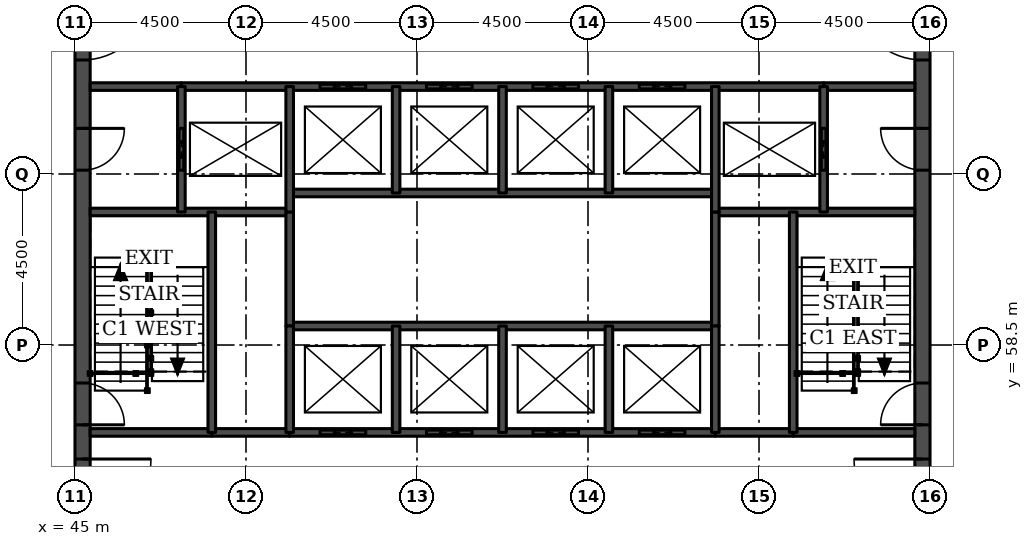
"""IFC4 building model, lengths in metres.
Left out: names, types, materials, properties, quantities, classifications, styles, units other than length and angle.
Written with IfcOpenShell. Run it as: python <this file> out.ifc"""

import sys

from ifc_helpers import new_model, si_unit, direction, frame, frame_2d, origin, place, context, subcontext, project, spatial, rectangle, extrude, element, fill, save


model = new_model("IFC4")
c1 = context("Model", 3, precision=1e-05, world=origin(), true_north=direction((0.0, 1.0)))
c2 = subcontext(c1, "Body", "Model", "MODEL_VIEW")
j1 = project(units=[si_unit("LENGTHUNIT", "METRE"), si_unit("PLANEANGLEUNIT", "RADIAN")], contexts=[c1])
p1 = place(None, origin())
s1 = spatial("IfcSite", under=j1, at=p1, CompositionType="ELEMENT")
p2 = place(p1, origin())
s2 = spatial("IfcBuilding", under=s1, at=p2, CompositionType="ELEMENT")
p3 = place(p2, frame((0.0, 0.0, 166.2)))
s3 = spatial("IfcBuildingStorey", under=s2, at=p3, CompositionType="ELEMENT", Elevation=166.2)
p4 = place(p3, frame((45.2, 49.5, 0.0), z_axis=(0.0, 0.0, 1.0), x_axis=(0.0, 1.0, 0.0)))
e1 = element("IfcWall", 1, at=p4, inside=s3, PredefinedType="SHEAR", context=c2, shape_type="SweptSolid", body=[
    extrude(rectangle(XDim=22.5, YDim=0.4, at=frame_2d((11.25, 0.0))), origin(), (0.0, 0.0, 1.0), 3.7),
])
p5 = place(p4, frame((4.2, 0.0, 0.0)))
e2 = element("IfcOpeningElement", 2, at=p5, cuts=e1, PredefinedType="OPENING", context=c2, shape_type="SweptSolid", body=[
    extrude(rectangle(XDim=1.8, YDim=2.1, at=frame_2d((0.9, 1.05))), frame((0.0, 0.21, 0.0), z_axis=(0.0, -1.0, 0.0), x_axis=(1.0, 0.0, 0.0)), (0.0, 0.0, 1.0), 0.42),
])
p6 = place(p4, frame((6.9, 0.0, 0.0)))
e3 = element("IfcOpeningElement", 3, at=p6, cuts=e1, PredefinedType="OPENING", context=c2, shape_type="SweptSolid", body=[
    extrude(rectangle(XDim=1.1, YDim=2.1, at=frame_2d((0.55, 1.05))), frame((0.0, 0.21, 0.0), z_axis=(0.0, -1.0, 0.0), x_axis=(1.0, 0.0, 0.0)), (0.0, 0.0, 1.0), 0.42),
])
p7 = place(p4, frame((13.6, 0.0, 0.0)))
e4 = element("IfcOpeningElement", 4, at=p7, cuts=e1, PredefinedType="OPENING", context=c2, shape_type="SweptSolid", body=[
    extrude(rectangle(XDim=1.1, YDim=2.1, at=frame_2d((0.55, 1.05))), frame((0.0, 0.21, 0.0), z_axis=(0.0, -1.0, 0.0), x_axis=(1.0, 0.0, 0.0)), (0.0, 0.0, 1.0), 0.42),
])
p8 = place(p4, frame((16.5, 0.0, 0.0)))
e5 = element("IfcOpeningElement", 5, at=p8, cuts=e1, PredefinedType="OPENING", context=c2, shape_type="SweptSolid", body=[
    extrude(rectangle(XDim=1.8, YDim=2.1, at=frame_2d((0.9, 1.05))), frame((0.0, 0.21, 0.0), z_axis=(0.0, -1.0, 0.0), x_axis=(1.0, 0.0, 0.0)), (0.0, 0.0, 1.0), 0.42),
])
p9 = place(p3, frame((67.3, 49.5, 0.0), z_axis=(0.0, 0.0, 1.0), x_axis=(0.0, 1.0, 0.0)))
e6 = element("IfcWall", 6, at=p9, inside=s3, PredefinedType="SHEAR", context=c2, shape_type="SweptSolid", body=[
    extrude(rectangle(XDim=22.5, YDim=0.4, at=frame_2d((11.25, 0.0))), origin(), (0.0, 0.0, 1.0), 3.7),
])
p10 = place(p9, frame((4.2, 0.0, 0.0)))
e7 = element("IfcOpeningElement", 7, at=p10, cuts=e6, PredefinedType="OPENING", context=c2, shape_type="SweptSolid", body=[
    extrude(rectangle(XDim=1.8, YDim=2.1, at=frame_2d((0.9, 1.05))), frame((0.0, 0.21, 0.0), z_axis=(0.0, -1.0, 0.0), x_axis=(1.0, 0.0, 0.0)), (0.0, 0.0, 1.0), 0.42),
])
p11 = place(p9, frame((6.9, 0.0, 0.0)))
e8 = element("IfcOpeningElement", 8, at=p11, cuts=e6, PredefinedType="OPENING", context=c2, shape_type="SweptSolid", body=[
    extrude(rectangle(XDim=1.1, YDim=2.1, at=frame_2d((0.55, 1.05))), frame((0.0, 0.21, 0.0), z_axis=(0.0, -1.0, 0.0), x_axis=(1.0, 0.0, 0.0)), (0.0, 0.0, 1.0), 0.42),
])
p12 = place(p9, frame((13.6, 0.0, 0.0)))
e9 = element("IfcOpeningElement", 9, at=p12, cuts=e6, PredefinedType="OPENING", context=c2, shape_type="SweptSolid", body=[
    extrude(rectangle(XDim=1.1, YDim=2.1, at=frame_2d((0.55, 1.05))), frame((0.0, 0.21, 0.0), z_axis=(0.0, -1.0, 0.0), x_axis=(1.0, 0.0, 0.0)), (0.0, 0.0, 1.0), 0.42),
])
p13 = place(p9, frame((16.5, 0.0, 0.0)))
e10 = element("IfcOpeningElement", 10, at=p13, cuts=e6, PredefinedType="OPENING", context=c2, shape_type="SweptSolid", body=[
    extrude(rectangle(XDim=1.8, YDim=2.1, at=frame_2d((0.9, 1.05))), frame((0.0, 0.21, 0.0), z_axis=(0.0, -1.0, 0.0), x_axis=(1.0, 0.0, 0.0)), (0.0, 0.0, 1.0), 0.42),
])
for number, where, z_axis, x_axis in (
    (11, (48.6, 56.2, 0.0), (0.0, 0.0, 1.0), (1.0, 0.0, 0.0)),
    (12, (61.85, 56.2, 0.0), (0.0, 0.0, 1.0), (1.0, 0.0, 0.0)),
):
    element("IfcWall", number, at=place(p3, frame(where, z_axis=z_axis, x_axis=x_axis)), inside=s3, PredefinedType="SOLIDWALL", context=c2, shape_type="SweptSolid", body=[
        extrude(rectangle(XDim=2.05, YDim=0.2, at=frame_2d((1.025, 0.0))), origin(), (0.0, 0.0, 1.0), 3.55),
    ])
p14 = place(p3, frame((45.4, 56.2, 0.0), z_axis=(0.0, 0.0, 1.0), x_axis=(1.0, 0.0, 0.0)))
e13 = element("IfcWall", 13, at=p14, inside=s3, PredefinedType="SOLIDWALL", context=c2, shape_type="SweptSolid", body=[
    extrude(rectangle(XDim=3.2, YDim=0.2, at=frame_2d((1.6, 0.0))), origin(), (0.0, 0.0, 1.0), 3.55),
])
p15 = place(p3, frame((50.65, 56.2, 0.0), z_axis=(0.0, 0.0, 1.0), x_axis=(1.0, 0.0, 0.0)))
e14 = element("IfcWall", 14, at=p15, inside=s3, PredefinedType="SOLIDWALL", context=c2, shape_type="SweptSolid", body=[
    extrude(rectangle(XDim=11.2, YDim=0.2, at=frame_2d((5.6, 0.0))), origin(), (0.0, 0.0, 1.0), 3.55),
])
p16 = place(p15, frame((0.8, 0.0, 0.0)))
e15 = element("IfcOpeningElement", 15, at=p16, cuts=e14, PredefinedType="OPENING", context=c2, shape_type="SweptSolid", body=[
    extrude(rectangle(XDim=1.2, YDim=2.1, at=frame_2d((0.6, 1.05))), frame((0.0, 0.11, 0.0), z_axis=(0.0, -1.0, 0.0), x_axis=(1.0, 0.0, 0.0)), (0.0, 0.0, 1.0), 0.22),
])
p17 = place(p15, frame((3.6, 0.0, 0.0)))
e16 = element("IfcOpeningElement", 16, at=p17, cuts=e14, PredefinedType="OPENING", context=c2, shape_type="SweptSolid", body=[
    extrude(rectangle(XDim=1.2, YDim=2.1, at=frame_2d((0.6, 1.05))), frame((0.0, 0.11, 0.0), z_axis=(0.0, -1.0, 0.0), x_axis=(1.0, 0.0, 0.0)), (0.0, 0.0, 1.0), 0.22),
])
p18 = place(p15, frame((6.4, 0.0, 0.0)))
e17 = element("IfcOpeningElement", 17, at=p18, cuts=e14, PredefinedType="OPENING", context=c2, shape_type="SweptSolid", body=[
    extrude(rectangle(XDim=1.2, YDim=2.1, at=frame_2d((0.6, 1.05))), frame((0.0, 0.11, 0.0), z_axis=(0.0, -1.0, 0.0), x_axis=(1.0, 0.0, 0.0)), (0.0, 0.0, 1.0), 0.22),
])
p19 = place(p15, frame((9.2, 0.0, 0.0)))
e18 = element("IfcOpeningElement", 18, at=p19, cuts=e14, PredefinedType="OPENING", context=c2, shape_type="SweptSolid", body=[
    extrude(rectangle(XDim=1.2, YDim=2.1, at=frame_2d((0.6, 1.05))), frame((0.0, 0.11, 0.0), z_axis=(0.0, -1.0, 0.0), x_axis=(1.0, 0.0, 0.0)), (0.0, 0.0, 1.0), 0.22),
])
p20 = place(p3, frame((63.9, 56.2, 0.0), z_axis=(0.0, 0.0, 1.0), x_axis=(1.0, 0.0, 0.0)))
e19 = element("IfcWall", 19, at=p20, inside=s3, PredefinedType="SOLIDWALL", context=c2, shape_type="SweptSolid", body=[
    extrude(rectangle(XDim=3.2, YDim=0.2, at=frame_2d((1.6, 0.0))), origin(), (0.0, 0.0, 1.0), 3.55),
])
p21 = place(p3, frame((50.65, 59.0, 0.0), z_axis=(0.0, 0.0, 1.0), x_axis=(1.0, 0.0, 0.0)))
e20 = element("IfcWall", 20, at=p21, inside=s3, PredefinedType="SOLIDWALL", context=c2, shape_type="SweptSolid", body=[
    extrude(rectangle(XDim=11.2, YDim=0.2, at=frame_2d((5.6, 0.0))), origin(), (0.0, 0.0, 1.0), 3.7),
])
for number, where, z_axis, x_axis in (
    (21, (45.4, 62.0, 0.0), (0.0, 0.0, 1.0), (1.0, 0.0, 0.0)),
    (22, (61.85, 62.0, 0.0), (0.0, 0.0, 1.0), (1.0, 0.0, 0.0)),
):
    element("IfcWall", number, at=place(p3, frame(where, z_axis=z_axis, x_axis=x_axis)), inside=s3, PredefinedType="SOLIDWALL", context=c2, shape_type="SweptSolid", body=[
        extrude(rectangle(XDim=5.25, YDim=0.2, at=frame_2d((2.625, 0.0))), origin(), (0.0, 0.0, 1.0), 3.55),
    ])
p22 = place(p3, frame((50.65, 62.5, 0.0), z_axis=(0.0, 0.0, 1.0), x_axis=(1.0, 0.0, 0.0)))
e23 = element("IfcWall", 23, at=p22, inside=s3, PredefinedType="SOLIDWALL", context=c2, shape_type="SweptSolid", body=[
    extrude(rectangle(XDim=11.2, YDim=0.2, at=frame_2d((5.6, 0.0))), origin(), (0.0, 0.0, 1.0), 3.7),
])
for number, where, z_axis, x_axis in (
    (24, (45.4, 65.3, 0.0), (0.0, 0.0, 1.0), (1.0, 0.0, 0.0)),
    (25, (64.7, 65.3, 0.0), (0.0, 0.0, 1.0), (1.0, 0.0, 0.0)),
):
    element("IfcWall", number, at=place(p3, frame(where, z_axis=z_axis, x_axis=x_axis)), inside=s3, PredefinedType="SOLIDWALL", context=c2, shape_type="SweptSolid", body=[
        extrude(rectangle(XDim=2.4, YDim=0.2, at=frame_2d((1.2, 0.0))), origin(), (0.0, 0.0, 1.0), 3.55),
    ])
p23 = place(p3, frame((47.8, 65.3, 0.0), z_axis=(0.0, 0.0, 1.0), x_axis=(1.0, 0.0, 0.0)))
e26 = element("IfcWall", 26, at=p23, inside=s3, PredefinedType="SOLIDWALL", context=c2, shape_type="SweptSolid", body=[
    extrude(rectangle(XDim=16.9, YDim=0.2, at=frame_2d((8.45, 0.0))), origin(), (0.0, 0.0, 1.0), 3.55),
])
p24 = place(p23, frame((3.65, 0.0, 0.0)))
e27 = element("IfcOpeningElement", 27, at=p24, cuts=e26, PredefinedType="OPENING", context=c2, shape_type="SweptSolid", body=[
    extrude(rectangle(XDim=1.2, YDim=2.1, at=frame_2d((0.6, 1.05))), frame((0.0, 0.11, 0.0), z_axis=(0.0, -1.0, 0.0), x_axis=(1.0, 0.0, 0.0)), (0.0, 0.0, 1.0), 0.22),
])
p25 = place(p23, frame((6.45, 0.0, 0.0)))
e28 = element("IfcOpeningElement", 28, at=p25, cuts=e26, PredefinedType="OPENING", context=c2, shape_type="SweptSolid", body=[
    extrude(rectangle(XDim=1.2, YDim=2.1, at=frame_2d((0.6, 1.05))), frame((0.0, 0.11, 0.0), z_axis=(0.0, -1.0, 0.0), x_axis=(1.0, 0.0, 0.0)), (0.0, 0.0, 1.0), 0.22),
])
p26 = place(p23, frame((9.25, 0.0, 0.0)))
e29 = element("IfcOpeningElement", 29, at=p26, cuts=e26, PredefinedType="OPENING", context=c2, shape_type="SweptSolid", body=[
    extrude(rectangle(XDim=1.2, YDim=2.1, at=frame_2d((0.6, 1.05))), frame((0.0, 0.11, 0.0), z_axis=(0.0, -1.0, 0.0), x_axis=(1.0, 0.0, 0.0)), (0.0, 0.0, 1.0), 0.22),
])
p27 = place(p23, frame((12.05, 0.0, 0.0)))
e30 = element("IfcOpeningElement", 30, at=p27, cuts=e26, PredefinedType="OPENING", context=c2, shape_type="SweptSolid", body=[
    extrude(rectangle(XDim=1.2, YDim=2.1, at=frame_2d((0.6, 1.05))), frame((0.0, 0.11, 0.0), z_axis=(0.0, -1.0, 0.0), x_axis=(1.0, 0.0, 0.0)), (0.0, 0.0, 1.0), 0.22),
])
p28 = place(p3, frame((47.8, 62.0, 0.0), z_axis=(0.0, 0.0, 1.0), x_axis=(0.0, 1.0, 0.0)))
e31 = element("IfcWall", 31, at=p28, inside=s3, PredefinedType="SOLIDWALL", context=c2, shape_type="SweptSolid", body=[
    extrude(rectangle(XDim=3.3, YDim=0.2, at=frame_2d((1.65, 0.0))), origin(), (0.0, 0.0, 1.0), 3.55),
])
p29 = place(p28, frame((1.1, 0.0, 0.0)))
e32 = element("IfcOpeningElement", 32, at=p29, cuts=e31, PredefinedType="OPENING", context=c2, shape_type="SweptSolid", body=[
    extrude(rectangle(XDim=1.1, YDim=2.1, at=frame_2d((0.55, 1.05))), frame((0.0, 0.11, 0.0), z_axis=(0.0, -1.0, 0.0), x_axis=(1.0, 0.0, 0.0)), (0.0, 0.0, 1.0), 0.22),
])
p30 = place(p3, frame((48.6, 56.2, 0.0), z_axis=(0.0, 0.0, 1.0), x_axis=(0.0, 1.0, 0.0)))
e33 = element("IfcWall", 33, at=p30, inside=s3, PredefinedType="SOLIDWALL", context=c2, shape_type="SweptSolid", body=[
    extrude(rectangle(XDim=5.8, YDim=0.2, at=frame_2d((2.9, 0.0))), origin(), (0.0, 0.0, 1.0), 3.55),
])
p31 = place(p3, frame((50.65, 59.0, 0.0), z_axis=(0.0, 0.0, 1.0), x_axis=(0.0, 1.0, 0.0)))
e34 = element("IfcWall", 34, at=p31, inside=s3, PredefinedType="SOLIDWALL", context=c2, shape_type="SweptSolid", body=[
    extrude(rectangle(XDim=3.0, YDim=0.2, at=frame_2d((1.5, 0.0))), origin(), (0.0, 0.0, 1.0), 3.7),
])
p32 = place(p3, frame((50.65, 56.2, 0.0), z_axis=(0.0, 0.0, 1.0), x_axis=(0.0, 1.0, 0.0)))
e35 = element("IfcWall", 35, at=p32, inside=s3, PredefinedType="SOLIDWALL", context=c2, shape_type="SweptSolid", body=[
    extrude(rectangle(XDim=2.8, YDim=0.2, at=frame_2d((1.4, 0.0))), origin(), (0.0, 0.0, 1.0), 3.55),
])
p33 = place(p3, frame((50.65, 62.0, 0.0), z_axis=(0.0, 0.0, 1.0), x_axis=(0.0, 1.0, 0.0)))
e36 = element("IfcWall", 36, at=p33, inside=s3, PredefinedType="SOLIDWALL", context=c2, shape_type="SweptSolid", body=[
    extrude(rectangle(XDim=3.3, YDim=0.2, at=frame_2d((1.65, 0.0))), origin(), (0.0, 0.0, 1.0), 3.55),
])
for number, where, z_axis, x_axis in (
    (37, (53.45, 56.2, 0.0), (0.0, 0.0, 1.0), (0.0, 1.0, 0.0)),
    (38, (53.45, 62.5, 0.0), (0.0, 0.0, 1.0), (0.0, 1.0, 0.0)),
    (39, (56.25, 56.2, 0.0), (0.0, 0.0, 1.0), (0.0, 1.0, 0.0)),
    (40, (56.25, 62.5, 0.0), (0.0, 0.0, 1.0), (0.0, 1.0, 0.0)),
    (41, (59.05, 56.2, 0.0), (0.0, 0.0, 1.0), (0.0, 1.0, 0.0)),
    (42, (59.05, 62.5, 0.0), (0.0, 0.0, 1.0), (0.0, 1.0, 0.0)),
):
    element("IfcWall", number, at=place(p3, frame(where, z_axis=z_axis, x_axis=x_axis)), inside=s3, PredefinedType="SOLIDWALL", context=c2, shape_type="SweptSolid", body=[
        extrude(rectangle(XDim=2.8, YDim=0.2, at=frame_2d((1.4, 0.0))), origin(), (0.0, 0.0, 1.0), 3.55),
    ])
p34 = place(p3, frame((61.85, 59.0, 0.0), z_axis=(0.0, 0.0, 1.0), x_axis=(0.0, 1.0, 0.0)))
e43 = element("IfcWall", 43, at=p34, inside=s3, PredefinedType="SOLIDWALL", context=c2, shape_type="SweptSolid", body=[
    extrude(rectangle(XDim=3.0, YDim=0.2, at=frame_2d((1.5, 0.0))), origin(), (0.0, 0.0, 1.0), 3.7),
])
p35 = place(p3, frame((61.85, 56.2, 0.0), z_axis=(0.0, 0.0, 1.0), x_axis=(0.0, 1.0, 0.0)))
e44 = element("IfcWall", 44, at=p35, inside=s3, PredefinedType="SOLIDWALL", context=c2, shape_type="SweptSolid", body=[
    extrude(rectangle(XDim=2.8, YDim=0.2, at=frame_2d((1.4, 0.0))), origin(), (0.0, 0.0, 1.0), 3.55),
])
p36 = place(p3, frame((61.85, 62.0, 0.0), z_axis=(0.0, 0.0, 1.0), x_axis=(0.0, 1.0, 0.0)))
e45 = element("IfcWall", 45, at=p36, inside=s3, PredefinedType="SOLIDWALL", context=c2, shape_type="SweptSolid", body=[
    extrude(rectangle(XDim=3.3, YDim=0.2, at=frame_2d((1.65, 0.0))), origin(), (0.0, 0.0, 1.0), 3.55),
])
p37 = place(p3, frame((63.9, 56.2, 0.0), z_axis=(0.0, 0.0, 1.0), x_axis=(0.0, 1.0, 0.0)))
e46 = element("IfcWall", 46, at=p37, inside=s3, PredefinedType="SOLIDWALL", context=c2, shape_type="SweptSolid", body=[
    extrude(rectangle(XDim=5.8, YDim=0.2, at=frame_2d((2.9, 0.0))), origin(), (0.0, 0.0, 1.0), 3.55),
])
p38 = place(p3, frame((64.7, 62.0, 0.0), z_axis=(0.0, 0.0, 1.0), x_axis=(0.0, 1.0, 0.0)))
e47 = element("IfcWall", 47, at=p38, inside=s3, PredefinedType="SOLIDWALL", context=c2, shape_type="SweptSolid", body=[
    extrude(rectangle(XDim=3.3, YDim=0.2, at=frame_2d((1.65, 0.0))), origin(), (0.0, 0.0, 1.0), 3.55),
])
p39 = place(p38, frame((1.1, 0.0, 0.0)))
e48 = element("IfcOpeningElement", 48, at=p39, cuts=e47, PredefinedType="OPENING", context=c2, shape_type="SweptSolid", body=[
    extrude(rectangle(XDim=1.1, YDim=2.1, at=frame_2d((0.55, 1.05))), frame((0.0, 0.11, 0.0), z_axis=(0.0, -1.0, 0.0), x_axis=(1.0, 0.0, 0.0)), (0.0, 0.0, 1.0), 0.22),
])
p40 = place(p16, origin())
e49 = element("IfcDoor", 49, at=p40, inside=s3, OperationType="DOUBLE_DOOR_SLIDING", PredefinedType="DOOR", context=c2, shape_type="SweptSolid", body=[
    extrude(rectangle(XDim=1.2, YDim=2.1, at=frame_2d((0.6, 1.05))), frame((0.0, 0.025, 0.0), z_axis=(0.0, -1.0, 0.0), x_axis=(1.0, 0.0, 0.0)), (0.0, 0.0, 1.0), 0.05),
])
fill(e15, e49)
p41 = place(p17, origin())
e50 = element("IfcDoor", 50, at=p41, inside=s3, OperationType="DOUBLE_DOOR_SLIDING", PredefinedType="DOOR", context=c2, shape_type="SweptSolid", body=[
    extrude(rectangle(XDim=1.2, YDim=2.1, at=frame_2d((0.6, 1.05))), frame((0.0, 0.025, 0.0), z_axis=(0.0, -1.0, 0.0), x_axis=(1.0, 0.0, 0.0)), (0.0, 0.0, 1.0), 0.05),
])
fill(e16, e50)
p42 = place(p18, origin())
e51 = element("IfcDoor", 51, at=p42, inside=s3, OperationType="DOUBLE_DOOR_SLIDING", PredefinedType="DOOR", context=c2, shape_type="SweptSolid", body=[
    extrude(rectangle(XDim=1.2, YDim=2.1, at=frame_2d((0.6, 1.05))), frame((0.0, 0.025, 0.0), z_axis=(0.0, -1.0, 0.0), x_axis=(1.0, 0.0, 0.0)), (0.0, 0.0, 1.0), 0.05),
])
fill(e17, e51)
p43 = place(p19, origin())
e52 = element("IfcDoor", 52, at=p43, inside=s3, OperationType="DOUBLE_DOOR_SLIDING", PredefinedType="DOOR", context=c2, shape_type="SweptSolid", body=[
    extrude(rectangle(XDim=1.2, YDim=2.1, at=frame_2d((0.6, 1.05))), frame((0.0, 0.025, 0.0), z_axis=(0.0, -1.0, 0.0), x_axis=(1.0, 0.0, 0.0)), (0.0, 0.0, 1.0), 0.05),
])
fill(e18, e52)
p44 = place(p24, origin())
e53 = element("IfcDoor", 53, at=p44, inside=s3, OperationType="DOUBLE_DOOR_SLIDING", PredefinedType="DOOR", context=c2, shape_type="SweptSolid", body=[
    extrude(rectangle(XDim=1.2, YDim=2.1, at=frame_2d((0.6, 1.05))), frame((0.0, 0.025, 0.0), z_axis=(0.0, -1.0, 0.0), x_axis=(1.0, 0.0, 0.0)), (0.0, 0.0, 1.0), 0.05),
])
fill(e27, e53)
p45 = place(p25, origin())
e54 = element("IfcDoor", 54, at=p45, inside=s3, OperationType="DOUBLE_DOOR_SLIDING", PredefinedType="DOOR", context=c2, shape_type="SweptSolid", body=[
    extrude(rectangle(XDim=1.2, YDim=2.1, at=frame_2d((0.6, 1.05))), frame((0.0, 0.025, 0.0), z_axis=(0.0, -1.0, 0.0), x_axis=(1.0, 0.0, 0.0)), (0.0, 0.0, 1.0), 0.05),
])
fill(e28, e54)
p46 = place(p26, origin())
e55 = element("IfcDoor", 55, at=p46, inside=s3, OperationType="DOUBLE_DOOR_SLIDING", PredefinedType="DOOR", context=c2, shape_type="SweptSolid", body=[
    extrude(rectangle(XDim=1.2, YDim=2.1, at=frame_2d((0.6, 1.05))), frame((0.0, 0.025, 0.0), z_axis=(0.0, -1.0, 0.0), x_axis=(1.0, 0.0, 0.0)), (0.0, 0.0, 1.0), 0.05),
])
fill(e29, e55)
p47 = place(p27, origin())
e56 = element("IfcDoor", 56, at=p47, inside=s3, OperationType="DOUBLE_DOOR_SLIDING", PredefinedType="DOOR", context=c2, shape_type="SweptSolid", body=[
    extrude(rectangle(XDim=1.2, YDim=2.1, at=frame_2d((0.6, 1.05))), frame((0.0, 0.025, 0.0), z_axis=(0.0, -1.0, 0.0), x_axis=(1.0, 0.0, 0.0)), (0.0, 0.0, 1.0), 0.05),
])
fill(e30, e56)
p48 = place(p29, origin())
e57 = element("IfcDoor", 57, at=p48, inside=s3, OperationType="DOUBLE_DOOR_SLIDING", PredefinedType="DOOR", context=c2, shape_type="SweptSolid", body=[
    extrude(rectangle(XDim=1.1, YDim=2.1, at=frame_2d((0.55, 1.05))), frame((0.0, 0.025, 0.0), z_axis=(0.0, -1.0, 0.0), x_axis=(1.0, 0.0, 0.0)), (0.0, 0.0, 1.0), 0.05),
])
fill(e32, e57)
p49 = place(p39, origin())
e58 = element("IfcDoor", 58, at=p49, inside=s3, OperationType="DOUBLE_DOOR_SLIDING", PredefinedType="DOOR", context=c2, shape_type="SweptSolid", body=[
    extrude(rectangle(XDim=1.1, YDim=2.1, at=frame_2d((0.55, 1.05))), frame((0.0, 0.025, 0.0), z_axis=(0.0, -1.0, 0.0), x_axis=(1.0, 0.0, 0.0)), (0.0, 0.0, 1.0), 0.05),
])
fill(e48, e58)
p50 = place(p5, frame((1.8, 0.0, 0.0), z_axis=(0.0, 0.0, 1.0), x_axis=(-1.0, 0.0, 0.0)))
e59 = element("IfcDoor", 59, at=p50, inside=s3, OperationType="SINGLE_SWING_LEFT", PredefinedType="DOOR", context=c2, shape_type="SweptSolid", body=[
    extrude(rectangle(XDim=1.8, YDim=2.1, at=frame_2d((0.9, 1.05))), frame((0.0, 0.025, 0.0), z_axis=(0.0, -1.0, 0.0), x_axis=(1.0, 0.0, 0.0)), (0.0, 0.0, 1.0), 0.05),
])
fill(e2, e59)
p51 = place(p6, frame((1.1, 0.0, 0.0), z_axis=(0.0, 0.0, 1.0), x_axis=(-1.0, 0.0, 0.0)))
e60 = element("IfcDoor", 60, at=p51, inside=s3, OperationType="SINGLE_SWING_RIGHT", PredefinedType="DOOR", context=c2, shape_type="SweptSolid", body=[
    extrude(rectangle(XDim=1.1, YDim=2.1, at=frame_2d((0.55, 1.05))), frame((0.0, 0.025, 0.0), z_axis=(0.0, -1.0, 0.0), x_axis=(1.0, 0.0, 0.0)), (0.0, 0.0, 1.0), 0.05),
])
fill(e3, e60)
p52 = place(p7, frame((1.1, 0.0, 0.0), z_axis=(0.0, 0.0, 1.0), x_axis=(-1.0, 0.0, 0.0)))
e61 = element("IfcDoor", 61, at=p52, inside=s3, OperationType="SINGLE_SWING_LEFT", PredefinedType="DOOR", context=c2, shape_type="SweptSolid", body=[
    extrude(rectangle(XDim=1.1, YDim=2.1, at=frame_2d((0.55, 1.05))), frame((0.0, 0.025, 0.0), z_axis=(0.0, -1.0, 0.0), x_axis=(1.0, 0.0, 0.0)), (0.0, 0.0, 1.0), 0.05),
])
fill(e4, e61)
p53 = place(p8, frame((1.8, 0.0, 0.0), z_axis=(0.0, 0.0, 1.0), x_axis=(-1.0, 0.0, 0.0)))
e62 = element("IfcDoor", 62, at=p53, inside=s3, OperationType="SINGLE_SWING_LEFT", PredefinedType="DOOR", context=c2, shape_type="SweptSolid", body=[
    extrude(rectangle(XDim=1.8, YDim=2.1, at=frame_2d((0.9, 1.05))), frame((0.0, 0.025, 0.0), z_axis=(0.0, -1.0, 0.0), x_axis=(1.0, 0.0, 0.0)), (0.0, 0.0, 1.0), 0.05),
])
fill(e5, e62)
p54 = place(p10, origin())
e63 = element("IfcDoor", 63, at=p54, inside=s3, OperationType="SINGLE_SWING_RIGHT", PredefinedType="DOOR", context=c2, shape_type="SweptSolid", body=[
    extrude(rectangle(XDim=1.8, YDim=2.1, at=frame_2d((0.9, 1.05))), frame((0.0, 0.025, 0.0), z_axis=(0.0, -1.0, 0.0), x_axis=(1.0, 0.0, 0.0)), (0.0, 0.0, 1.0), 0.05),
])
fill(e7, e63)
p55 = place(p11, origin())
e64 = element("IfcDoor", 64, at=p55, inside=s3, OperationType="SINGLE_SWING_LEFT", PredefinedType="DOOR", context=c2, shape_type="SweptSolid", body=[
    extrude(rectangle(XDim=1.1, YDim=2.1, at=frame_2d((0.55, 1.05))), frame((0.0, 0.025, 0.0), z_axis=(0.0, -1.0, 0.0), x_axis=(1.0, 0.0, 0.0)), (0.0, 0.0, 1.0), 0.05),
])
fill(e8, e64)
p56 = place(p12, origin())
e65 = element("IfcDoor", 65, at=p56, inside=s3, OperationType="SINGLE_SWING_RIGHT", PredefinedType="DOOR", context=c2, shape_type="SweptSolid", body=[
    extrude(rectangle(XDim=1.1, YDim=2.1, at=frame_2d((0.55, 1.05))), frame((0.0, 0.025, 0.0), z_axis=(0.0, -1.0, 0.0), x_axis=(1.0, 0.0, 0.0)), (0.0, 0.0, 1.0), 0.05),
])
fill(e9, e65)
p57 = place(p13, origin())
e66 = element("IfcDoor", 66, at=p57, inside=s3, OperationType="SINGLE_SWING_RIGHT", PredefinedType="DOOR", context=c2, shape_type="SweptSolid", body=[
    extrude(rectangle(XDim=1.8, YDim=2.1, at=frame_2d((0.9, 1.05))), frame((0.0, 0.025, 0.0), z_axis=(0.0, -1.0, 0.0), x_axis=(1.0, 0.0, 0.0)), (0.0, 0.0, 1.0), 0.05),
])
fill(e10, e66)
save(model, sys.argv[1])
